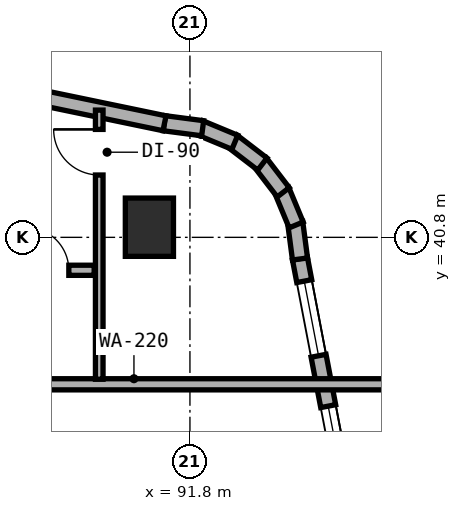
"""IFC4 building model, lengths in metres.
Left out: names, types, materials, properties, quantities, classifications, styles, units other than length and angle.
Written with IfcOpenShell. Run it as: python <this file> out.ifc"""

import sys

from ifc_helpers import new_model, si_unit, direction, frame, frame_2d, origin, origin_2d, place, context, subcontext, project, spatial, rectangle, extrude, element, fill, save


model = new_model("IFC4")
c1 = context("Model", 3, precision=1e-05, world=origin(), true_north=direction((0.0, 1.0)))
c2 = subcontext(c1, "Body", "Model", "MODEL_VIEW")
j1 = project(units=[si_unit("LENGTHUNIT", "METRE"), si_unit("PLANEANGLEUNIT", "RADIAN")], contexts=[c1])
p1 = place(None, origin())
s1 = spatial("IfcSite", under=j1, at=p1, CompositionType="ELEMENT")
p2 = place(p1, origin())
s2 = spatial("IfcBuilding", under=s1, at=p2, CompositionType="ELEMENT")
p3 = place(p2, frame((0.0, 0.0, 59.0)))
s3 = spatial("IfcBuildingStorey", under=s2, at=p3, CompositionType="ELEMENT", Elevation=59.0)
p4 = place(p3, frame((91.0, 41.0, 0.0), z_axis=(0.0, 0.0, 1.0), x_axis=(1.0, 0.0, 0.0)))
e1 = element("IfcColumn", 1, at=p4, inside=s3, PredefinedType="COLUMN", context=c2, shape_type="SweptSolid", body=[
    extrude(rectangle(XDim=0.95, YDim=1.15, at=origin_2d()), origin(), (0.0, 0.0, 1.0), 3.5),
])
p5 = place(p3, frame((95.783, 30.918, 0.0), z_axis=(0.0, 0.0, 1.0), x_axis=(-0.188087874316, 0.982152203854, 0.0)))
e2 = element("IfcWall", 2, at=p5, inside=s3, PredefinedType="STANDARD", context=c2, shape_type="SweptSolid", body=[
    extrude(rectangle(XDim=9.634, YDim=0.3, at=frame_2d((4.817, 0.0))), origin(), (0.0, 0.0, 1.0), 3.25),
])
p6 = place(p5, frame((1.897, 0.0, 0.8)))
e3 = element("IfcOpeningElement", 3, at=p6, cuts=e2, PredefinedType="OPENING", context=c2, shape_type="SweptSolid", body=[
    extrude(rectangle(XDim=2.4, YDim=1.6, at=frame_2d((1.2, 0.8))), frame((0.0, 0.16, 0.0), z_axis=(0.0, -1.0, 0.0), x_axis=(1.0, 0.0, 0.0)), (0.0, 0.0, 1.0), 0.32),
])
p7 = place(p5, frame((5.47, 0.0, 0.85)))
e4 = element("IfcOpeningElement", 4, at=p7, cuts=e2, PredefinedType="OPENING", context=c2, shape_type="SweptSolid", body=[
    extrude(rectangle(XDim=1.2, YDim=1.5, at=frame_2d((0.6, 0.75))), frame((0.0, 0.16, 0.0), z_axis=(0.0, -1.0, 0.0), x_axis=(1.0, 0.0, 0.0)), (0.0, 0.0, 1.0), 0.32),
])
p8 = place(p5, frame((7.682, 0.0, 0.85)))
e5 = element("IfcOpeningElement", 5, at=p8, cuts=e2, PredefinedType="OPENING", context=c2, shape_type="SweptSolid", body=[
    extrude(rectangle(XDim=1.5, YDim=1.5, at=frame_2d((0.75, 0.75))), frame((0.0, 0.16, 0.0), z_axis=(0.0, -1.0, 0.0), x_axis=(1.0, 0.0, 0.0)), (0.0, 0.0, 1.0), 0.32),
])
p9 = place(p3, frame((93.972, 40.373, 0.0), z_axis=(0.0, 0.0, 1.0), x_axis=(-0.130255288807, 0.991480488834, 0.0)))
e6 = element("IfcWall", 6, at=p9, inside=s3, PredefinedType="STANDARD", context=c2, shape_type="SweptSolid", body=[
    extrude(rectangle(XDim=0.729, YDim=0.3, at=frame_2d((0.365, 0.0))), origin(), (0.0, 0.0, 1.0), 3.25),
])
p10 = place(p3, frame((93.896, 41.045, 0.0), z_axis=(0.0, 0.0, 1.0), x_axis=(-0.383267045233, 0.923637576129, 0.0)))
e7 = element("IfcWall", 7, at=p10, inside=s3, PredefinedType="STANDARD", context=c2, shape_type="SweptSolid", body=[
    extrude(rectangle(XDim=0.746, YDim=0.3, at=frame_2d((0.373, 0.0))), origin(), (0.0, 0.0, 1.0), 3.25),
])
for number, where, z_axis, x_axis in (
    (8, (93.641, 41.689, 0.0), (0.0, 0.0, 1.0), (-0.609, 0.793, 0.0)),
    (9, (93.229, 42.246, 0.0), (0.0, 0.0, 1.0), (-0.794, 0.608, 0.0)),
):
    element("IfcWall", number, at=place(p3, frame(where, z_axis=z_axis, x_axis=x_axis)), inside=s3, PredefinedType="STANDARD", context=c2, shape_type="SweptSolid", body=[
        extrude(rectangle(XDim=0.746, YDim=0.3, at=frame_2d((0.373, 0.0))), origin(), (0.0, 0.0, 1.0), 3.25),
    ])
p11 = place(p3, frame((92.686, 42.676, 0.0), z_axis=(0.0, 0.0, 1.0), x_axis=(-0.923637576129, 0.383267045233, 0.0)))
e10 = element("IfcWall", 10, at=p11, inside=s3, PredefinedType="STANDARD", context=c2, shape_type="SweptSolid", body=[
    extrude(rectangle(XDim=0.746, YDim=0.3, at=frame_2d((0.373, 0.0))), origin(), (0.0, 0.0, 1.0), 3.25),
])
p12 = place(p3, frame((92.051, 42.953, 0.0), z_axis=(0.0, 0.0, 1.0), x_axis=(-0.991559404866, 0.129653178221, 0.0)))
e11 = element("IfcWall", 11, at=p12, inside=s3, PredefinedType="STANDARD", context=c2, shape_type="SweptSolid", body=[
    extrude(rectangle(XDim=0.764, YDim=0.3, at=frame_2d((0.382, 0.0))), origin(), (0.0, 0.0, 1.0), 3.25),
])
p13 = place(p3, frame((91.298, 43.051, 0.0), z_axis=(0.0, 0.0, 1.0), x_axis=(-0.979120793441, 0.203279295189, 0.0)))
e12 = element("IfcWall", 12, at=p13, inside=s3, PredefinedType="STANDARD", context=c2, shape_type="SweptSolid", body=[
    extrude(rectangle(XDim=8.855, YDim=0.3, at=frame_2d((4.427, 0.0))), origin(), (0.0, 0.0, 1.0), 3.25),
])
p14 = place(p13, frame((3.925, 0.0, 0.8)))
e13 = element("IfcOpeningElement", 13, at=p14, cuts=e12, PredefinedType="OPENING", context=c2, shape_type="SweptSolid", body=[
    extrude(rectangle(XDim=2.4, YDim=1.6, at=frame_2d((1.2, 0.8))), frame((0.0, 0.16, 0.0), z_axis=(0.0, -1.0, 0.0), x_axis=(1.0, 0.0, 0.0)), (0.0, 0.0, 1.0), 0.32),
])
p15 = place(p3, frame((85.63, 37.9, 0.0), z_axis=(0.0, 0.0, 1.0), x_axis=(1.0, 0.0, 0.0)))
e14 = element("IfcWall", 14, at=p15, inside=s3, PredefinedType="SOLIDWALL", context=c2, shape_type="SweptSolid", body=[
    extrude(rectangle(XDim=10.13, YDim=0.22, at=frame_2d((5.065, 0.0))), origin(), (0.0, 0.0, 1.0), 2.865),
])
p16 = place(p3, frame((90.01, 38.0, 0.0), z_axis=(0.0, 0.0, 1.0), x_axis=(0.0, 1.0, 0.0)))
e15 = element("IfcWall", 15, at=p16, inside=s3, PredefinedType="PARTITIONING", context=c2, shape_type="SweptSolid", body=[
    extrude(rectangle(XDim=5.311, YDim=0.15, at=frame_2d((2.656, 0.0))), origin(), (0.0, 0.0, 1.0), 2.865),
])
p17 = place(p16, frame((4.03, 0.0, 0.0)))
e16 = element("IfcOpeningElement", 16, at=p17, cuts=e15, PredefinedType="OPENING", context=c2, shape_type="SweptSolid", body=[
    extrude(rectangle(XDim=0.9, YDim=2.1, at=frame_2d((0.45, 1.05))), frame((0.0, 0.085, 0.0), z_axis=(0.0, -1.0, 0.0), x_axis=(1.0, 0.0, 0.0)), (0.0, 0.0, 1.0), 0.17),
])
p18 = place(p3, frame((88.06, 40.15, 0.0), z_axis=(0.0, 0.0, 1.0), x_axis=(1.0, 0.0, 0.0)))
e17 = element("IfcWall", 17, at=p18, inside=s3, PredefinedType="PLUMBINGWALL", context=c2, shape_type="SweptSolid", body=[
    extrude(rectangle(XDim=1.85, YDim=0.2, at=frame_2d((0.925, 0.0))), origin(), (0.0, 0.0, 1.0), 3.22),
])
p19 = place(p18, frame((0.5, 0.0, 0.0)))
e18 = element("IfcOpeningElement", 18, at=p19, cuts=e17, PredefinedType="OPENING", context=c2, shape_type="SweptSolid", body=[
    extrude(rectangle(XDim=0.85, YDim=2.1, at=frame_2d((0.425, 1.05))), frame((0.0, 0.11, 0.0), z_axis=(0.0, -1.0, 0.0), x_axis=(1.0, 0.0, 0.0)), (0.0, 0.0, 1.0), 0.22),
])
p20 = place(p7, origin())
e19 = element("IfcWindow", 19, at=p20, inside=s3, PartitioningType="SINGLE_PANEL", PredefinedType="WINDOW", context=c2, shape_type="SweptSolid", body=[
    extrude(rectangle(XDim=1.2, YDim=1.5, at=frame_2d((0.6, 0.75))), frame((0.0, 0.03, 0.0), z_axis=(0.0, -1.0, 0.0), x_axis=(1.0, 0.0, 0.0)), (0.0, 0.0, 1.0), 0.06),
])
fill(e4, e19)
p21 = place(p8, origin())
e20 = element("IfcWindow", 20, at=p21, inside=s3, PartitioningType="SINGLE_PANEL", PredefinedType="WINDOW", context=c2, shape_type="SweptSolid", body=[
    extrude(rectangle(XDim=1.5, YDim=1.5, at=frame_2d((0.75, 0.75))), frame((0.0, 0.03, 0.0), z_axis=(0.0, -1.0, 0.0), x_axis=(1.0, 0.0, 0.0)), (0.0, 0.0, 1.0), 0.06),
])
fill(e5, e20)
p22 = place(p17, origin())
e21 = element("IfcDoor", 21, at=p22, inside=s3, OperationType="SINGLE_SWING_RIGHT", PredefinedType="DOOR", context=c2, shape_type="SweptSolid", body=[
    extrude(rectangle(XDim=0.9, YDim=2.1, at=frame_2d((0.45, 1.05))), frame((0.0, 0.025, 0.0), z_axis=(0.0, -1.0, 0.0), x_axis=(1.0, 0.0, 0.0)), (0.0, 0.0, 1.0), 0.05),
])
fill(e16, e21)
p23 = place(p19, origin())
e22 = element("IfcDoor", 22, at=p23, inside=s3, OperationType="SINGLE_SWING_LEFT", PredefinedType="DOOR", context=c2, shape_type="SweptSolid", body=[
    extrude(rectangle(XDim=0.85, YDim=2.1, at=frame_2d((0.425, 1.05))), frame((0.0, 0.025, 0.0), z_axis=(0.0, -1.0, 0.0), x_axis=(1.0, 0.0, 0.0)), (0.0, 0.0, 1.0), 0.05),
])
fill(e18, e22)
save(model, sys.argv[1])
